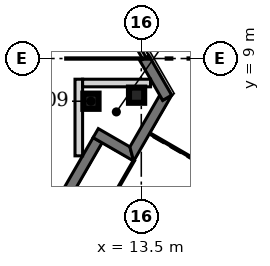
"""IFC4 building model, lengths in metres.
Left out: names, types, materials, properties, quantities, classifications, styles, units other than length and angle.
Written with IfcOpenShell. Run it as: python <this file> out.ifc"""

import sys

from ifc_helpers import new_model, si_unit, direction, frame, frame_2d, origin, origin_2d, place, context, subcontext, project, spatial, polyline, rectangle, hollow_rectangle, outline, extrude, element, save


model = new_model("IFC4")
c1 = context("Model", 3, precision=1e-05, world=origin(), true_north=direction((0.0, 1.0)))
c2 = subcontext(c1, "Body", "Model", "MODEL_VIEW")
j1 = project(units=[si_unit("LENGTHUNIT", "METRE"), si_unit("PLANEANGLEUNIT", "RADIAN")], contexts=[c1])
p1 = place(None, origin())
s1 = spatial("IfcSite", under=j1, at=p1, CompositionType="ELEMENT")
p2 = place(p1, origin())
s2 = spatial("IfcBuilding", under=s1, at=p2, CompositionType="ELEMENT")
p3 = place(p2, frame((0.0, 0.0, 359.6)))
s3 = spatial("IfcBuildingStorey", under=s2, at=p3, CompositionType="ELEMENT", Elevation=359.6)
for number, where, z_axis, x_axis in (
    (1, (11.845, 7.595, 0.0), (0.0, 0.0, 1.0), (1.0, 0.0, 0.0)),
    (2, (13.345, 7.794, 0.0), (0.0, 0.0, 1.0), (1.0, 0.0, 0.0)),
):
    element("IfcColumn", number, at=place(p3, frame(where, z_axis=z_axis, x_axis=x_axis)), inside=s3, PredefinedType="COLUMN", context=c2, shape_type="SweptSolid", body=[
        extrude(hollow_rectangle(XDim=0.5, YDim=0.5, WallThickness=0.025, at=origin_2d()), origin(), (0.0, 0.0, 1.0), 3.6),
    ])
p4 = place(p3, frame((10.063, 2.85, 0.0), z_axis=(0.0, 0.0, 1.0), x_axis=(0.49999894854, 0.866026010844, 0.0)))
e3 = element("IfcWall", 3, at=p4, inside=s3, PredefinedType="SOLIDWALL", context=c2, shape_type="SweptSolid", body=[
    extrude(rectangle(XDim=4.0, YDim=0.34, at=frame_2d((2.0, 0.0))), origin(), (0.0, 0.0, 1.0), 3.6),
])
p5 = place(p4, frame((0.2, 0.0, 0.0)))
e4 = element("IfcOpeningElement", 4, at=p5, cuts=e3, PredefinedType="OPENING", context=c2, shape_type="SweptSolid", body=[
    extrude(rectangle(XDim=1.5, YDim=2.4, at=frame_2d((0.75, 1.2))), frame((0.0, 0.18, 0.0), z_axis=(0.0, -1.0, 0.0), x_axis=(1.0, 0.0, 0.0)), (0.0, 0.0, 1.0), 0.36),
])
p6 = place(p3, origin())
e5 = element("IfcWall", 5, at=p6, inside=s3, PredefinedType="SOLIDWALL", context=c2, shape_type="SweptSolid", body=[
    extrude(outline(polyline([(13.25, 5.628), (12.21, 6.229), (11.916, 6.399), (12.086, 6.694), (13.126, 6.094), (13.251, 5.628), (13.25, 5.628)])), origin(), (0.0, 0.0, 1.0), 3.6),
])
p7 = place(p3, origin())
e6 = element("IfcWall", 6, at=p7, inside=s3, PredefinedType="SOLIDWALL", context=c2, shape_type="SweptSolid", body=[
    extrude(outline(polyline([(14.107, 7.795), (14.206, 7.625), (14.501, 7.795), (14.501, 7.795), (13.25, 5.628), (13.25, 5.628), (13.125, 6.094), (14.107, 7.795)])), origin(), (0.0, 0.0, 1.0), 3.6),
])
p8 = place(p3, frame((14.353, 7.709, 0.0), z_axis=(0.0, 0.0, 1.0), x_axis=(-0.499990139034, 0.866031096941, 0.0)))
e7 = element("IfcWall", 7, at=p8, inside=s3, PredefinedType="SOLIDWALL", context=c2, shape_type="SweptSolid", body=[
    extrude(rectangle(XDim=1.5, YDim=0.34, at=frame_2d((0.75, 0.0))), origin(), (0.0, 0.0, 1.0), 3.6),
])
p9 = place(p3, frame((11.445, 5.799, 0.0), z_axis=(0.0, 0.0, 1.0), x_axis=(0.0, 1.0, 0.0)))
e8 = element("IfcWall", 8, at=p9, inside=s3, PredefinedType="SOLIDWALL", context=c2, shape_type="SweptSolid", body=[
    extrude(rectangle(XDim=2.52, YDim=0.25, at=frame_2d((1.26, 0.0))), origin(), (0.0, 0.0, 1.0), 3.6),
])
p10 = place(p3, frame((11.57, 8.194, 0.0), z_axis=(0.0, 0.0, 1.0), x_axis=(1.0, 0.0, 0.0)))
e9 = element("IfcWall", 9, at=p10, inside=s3, PredefinedType="SOLIDWALL", context=c2, shape_type="SweptSolid", body=[
    extrude(rectangle(XDim=2.235, YDim=0.25, at=frame_2d((1.117, 0.0))), origin(), (0.0, 0.0, 1.0), 3.6),
])
save(model, sys.argv[1])
